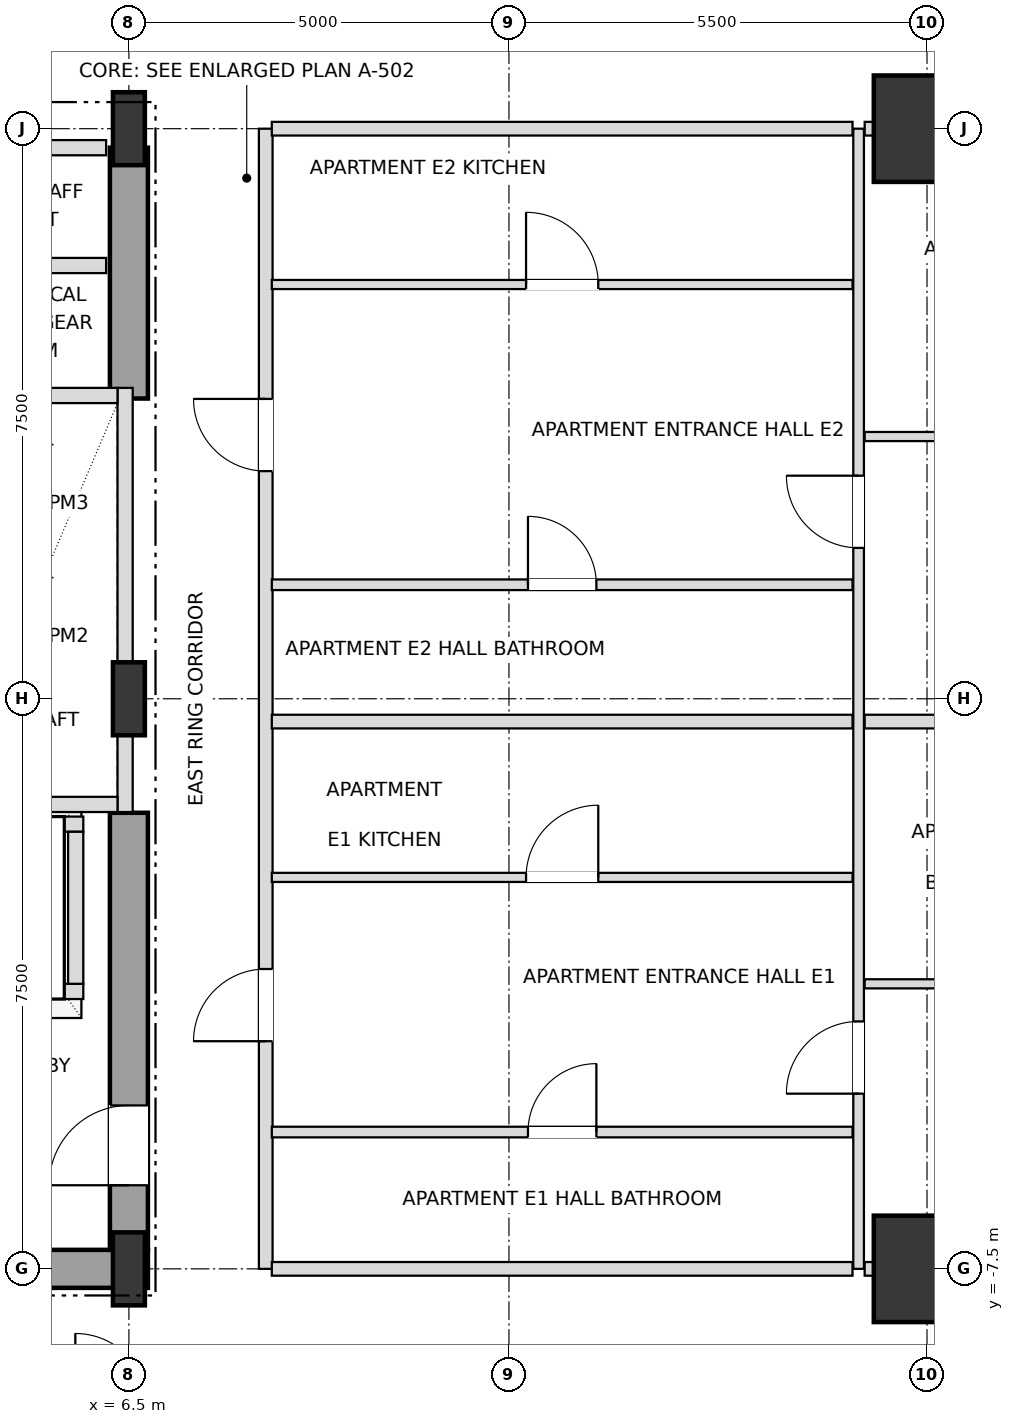
"""IFC4 building model, lengths in metres.
Left out: names, types, materials, properties, quantities, classifications, styles, units other than length and angle.
Written with IfcOpenShell. Run it as: python <this file> out.ifc"""

import sys

from ifc_helpers import new_model, si_unit, direction, frame, frame_2d, origin, origin_2d, place, context, subcontext, project, spatial, rectangle, i_section, extrude, element, fill, save


model = new_model("IFC4")
c1 = context("Model", 3, precision=1e-05, world=origin(), true_north=direction((0.0, 1.0)))
c2 = subcontext(c1, "Body", "Model", "MODEL_VIEW")
j1 = project(units=[si_unit("LENGTHUNIT", "METRE"), si_unit("PLANEANGLEUNIT", "RADIAN")], contexts=[c1])
p1 = place(None, origin())
s1 = spatial("IfcSite", under=j1, at=p1, CompositionType="ELEMENT")
p2 = place(p1, origin())
s2 = spatial("IfcBuilding", under=s1, at=p2, CompositionType="ELEMENT")
p3 = place(p2, frame((0.0, 0.0, 90.0)))
s3 = spatial("IfcBuildingStorey", under=s2, at=p3, CompositionType="ELEMENT", Elevation=90.0)
for number, where, z_axis, x_axis in (
    (1, (6.5, -7.5, 0.0), (0.0, 0.0, 1.0), (1.0, 0.0, 0.0)),
    (2, (6.5, 0.0, 0.0), (0.0, 0.0, 1.0), (1.0, 0.0, 0.0)),
    (3, (6.5, 7.5, 0.0), (0.0, 0.0, 1.0), (1.0, 0.0, 0.0)),
):
    element("IfcColumn", number, at=place(p3, frame(where, z_axis=z_axis, x_axis=x_axis)), inside=s3, PredefinedType="COLUMN", context=c2, shape_type="SweptSolid", body=[
        extrude(i_section(OverallWidth=0.42, OverallDepth=0.96, WebThickness=0.022, FlangeThickness=0.034, at=origin_2d()), origin(), (0.0, 0.0, 1.0), 3.6),
    ])
for number, where, z_axis, x_axis in (
    (4, (17.0, -7.5, 0.0), (0.0, 0.0, 1.0), (1.0, 0.0, 0.0)),
    (5, (17.0, 7.5, 0.0), (0.0, 0.0, 1.0), (1.0, 0.0, 0.0)),
):
    element("IfcColumn", number, at=place(p3, frame(where, z_axis=z_axis, x_axis=x_axis)), inside=s3, PredefinedType="USERDEFINED", context=c2, shape_type="SweptSolid", body=[
        extrude(rectangle(XDim=1.4, YDim=1.4, at=origin_2d()), origin(), (0.0, 0.0, 1.0), 3.6),
    ])
p4 = place(p3, frame((0.0, -7.5, 0.0), z_axis=(0.0, 0.0, 1.0), x_axis=(1.0, 0.0, 0.0)))
e6 = element("IfcWall", 6, at=p4, inside=s3, PredefinedType="SHEAR", context=c2, shape_type="SweptSolid", body=[
    extrude(rectangle(XDim=6.75, YDim=0.5, at=frame_2d((3.375, 0.0))), origin(), (0.0, 0.0, 1.0), 3.3),
])
p5 = place(p3, frame((6.5, -7.25, 0.0), z_axis=(0.0, 0.0, 1.0), x_axis=(0.0, 1.0, 0.0)))
e7 = element("IfcWall", 7, at=p5, inside=s3, PredefinedType="SHEAR", context=c2, shape_type="SweptSolid", body=[
    extrude(rectangle(XDim=5.75, YDim=0.5, at=frame_2d((2.875, 0.0))), origin(), (0.0, 0.0, 1.0), 3.3),
])
p6 = place(p5, frame((0.85, 0.0, 0.0)))
e8 = element("IfcOpeningElement", 8, at=p6, cuts=e7, PredefinedType="OPENING", context=c2, shape_type="SweptSolid", body=[
    extrude(rectangle(XDim=1.05, YDim=2.15, at=frame_2d((0.525, 1.075))), frame((0.0, 0.26, 0.0), z_axis=(0.0, -1.0, 0.0), x_axis=(1.0, 0.0, 0.0)), (0.0, 0.0, 1.0), 0.52),
])
p7 = place(p3, frame((6.5, 3.95, 0.0), z_axis=(0.0, 0.0, 1.0), x_axis=(0.0, 1.0, 0.0)))
e9 = element("IfcWall", 9, at=p7, inside=s3, PredefinedType="SHEAR", context=c2, shape_type="SweptSolid", body=[
    extrude(rectangle(XDim=3.3, YDim=0.5, at=frame_2d((1.65, 0.0))), origin(), (0.0, 0.0, 1.0), 3.3),
])
p8 = place(p3, frame((6.45, -1.49, 0.0), z_axis=(0.0, 0.0, 1.0), x_axis=(0.0, 1.0, 0.0)))
e10 = element("IfcWall", 10, at=p8, inside=s3, PredefinedType="SOLIDWALL", context=c2, shape_type="SweptSolid", body=[
    extrude(rectangle(XDim=5.58, YDim=0.2, at=frame_2d((2.79, 0.0))), origin(), (0.0, 0.0, 1.0), 2.736),
])
for number, where, z_axis, x_axis in (
    (11, (4.15, -1.39, 0.0), (0.0, 0.0, 1.0), (1.0, 0.0, 0.0)),
    (12, (4.15, 3.99, 0.0), (0.0, 0.0, 1.0), (1.0, 0.0, 0.0)),
):
    element("IfcWall", number, at=place(p3, frame(where, z_axis=z_axis, x_axis=x_axis)), inside=s3, PredefinedType="SOLIDWALL", context=c2, shape_type="SweptSolid", body=[
        extrude(rectangle(XDim=2.2, YDim=0.2, at=frame_2d((1.1, 0.0))), origin(), (0.0, 0.0, 1.0), 3.3),
    ])
p9 = place(p3, frame((1.8, -3.85, 0.0), z_axis=(0.0, 0.0, 1.0), x_axis=(1.0, 0.0, 0.0)))
e13 = element("IfcWall", 13, at=p9, inside=s3, PredefinedType="SOLIDWALL", context=c2, shape_type="SweptSolid", body=[
    extrude(rectangle(XDim=4.1, YDim=0.2, at=frame_2d((2.05, 0.0))), origin(), (0.0, 0.0, 1.0), 3.3),
])
p10 = place(p9, frame((0.45, 0.0, 0.0)))
e14 = element("IfcOpeningElement", 14, at=p10, cuts=e13, PredefinedType="OPENING", context=c2, shape_type="SweptSolid", body=[
    extrude(rectangle(XDim=1.2, YDim=2.2, at=frame_2d((0.6, 1.1))), frame((0.0, 0.11, 0.0), z_axis=(0.0, -1.0, 0.0), x_axis=(1.0, 0.0, 0.0)), (0.0, 0.0, 1.0), 0.22),
])
p11 = place(p9, frame((2.45, 0.0, 0.0)))
e15 = element("IfcOpeningElement", 15, at=p11, cuts=e13, PredefinedType="OPENING", context=c2, shape_type="SweptSolid", body=[
    extrude(rectangle(XDim=1.2, YDim=2.2, at=frame_2d((0.6, 1.1))), frame((0.0, 0.11, 0.0), z_axis=(0.0, -1.0, 0.0), x_axis=(1.0, 0.0, 0.0)), (0.0, 0.0, 1.0), 0.22),
])
p12 = place(p3, frame((1.8, -1.65, 0.0), z_axis=(0.0, 0.0, 1.0), x_axis=(1.0, 0.0, 0.0)))
e16 = element("IfcWall", 16, at=p12, inside=s3, PredefinedType="SOLIDWALL", context=c2, shape_type="SweptSolid", body=[
    extrude(rectangle(XDim=4.1, YDim=0.2, at=frame_2d((2.05, 0.0))), origin(), (0.0, 0.0, 1.0), 3.3),
])
p13 = place(p3, frame((5.8, -3.75, 0.0), z_axis=(0.0, 0.0, 1.0), x_axis=(0.0, 1.0, 0.0)))
e17 = element("IfcWall", 17, at=p13, inside=s3, PredefinedType="SOLIDWALL", context=c2, shape_type="SweptSolid", body=[
    extrude(rectangle(XDim=2.0, YDim=0.2, at=frame_2d((1.0, 0.0))), origin(), (0.0, 0.0, 1.0), 3.3),
])
p14 = place(p3, frame((8.3, -7.5, 0.0), z_axis=(0.0, 0.0, 1.0), x_axis=(0.0, 1.0, 0.0)))
e18 = element("IfcWall", 18, at=p14, inside=s3, PredefinedType="PARTITIONING", context=c2, shape_type="SweptSolid", body=[
    extrude(rectangle(XDim=15.0, YDim=0.18, at=frame_2d((7.5, 0.0))), origin(), (0.0, 0.0, 1.0), 3.3),
])
p15 = place(p14, frame((2.995, 0.0, 0.0)))
e19 = element("IfcOpeningElement", 19, at=p15, cuts=e18, PredefinedType="OPENING", context=c2, shape_type="SweptSolid", body=[
    extrude(rectangle(XDim=0.95, YDim=2.15, at=frame_2d((0.475, 1.075))), frame((0.0, 0.1, 0.0), z_axis=(0.0, -1.0, 0.0), x_axis=(1.0, 0.0, 0.0)), (0.0, 0.0, 1.0), 0.2),
])
p16 = place(p14, frame((10.495, 0.0, 0.0)))
e20 = element("IfcOpeningElement", 20, at=p16, cuts=e18, PredefinedType="OPENING", context=c2, shape_type="SweptSolid", body=[
    extrude(rectangle(XDim=0.95, YDim=2.15, at=frame_2d((0.475, 1.075))), frame((0.0, 0.1, 0.0), z_axis=(0.0, -1.0, 0.0), x_axis=(1.0, 0.0, 0.0)), (0.0, 0.0, 1.0), 0.2),
])
p17 = place(p3, frame((16.1, -7.5, 0.0), z_axis=(0.0, 0.0, 1.0), x_axis=(0.0, 1.0, 0.0)))
e21 = element("IfcWall", 21, at=p17, inside=s3, PredefinedType="PARTITIONING", context=c2, shape_type="SweptSolid", body=[
    extrude(rectangle(XDim=15.0, YDim=0.14, at=frame_2d((7.5, 0.0))), origin(), (0.0, 0.0, 1.0), 3.3),
])
p18 = place(p17, frame((2.305, 0.0, 0.0)))
e22 = element("IfcOpeningElement", 22, at=p18, cuts=e21, PredefinedType="OPENING", context=c2, shape_type="SweptSolid", body=[
    extrude(rectangle(XDim=0.95, YDim=2.1, at=frame_2d((0.475, 1.05))), frame((0.0, 0.08, 0.0), z_axis=(0.0, -1.0, 0.0), x_axis=(1.0, 0.0, 0.0)), (0.0, 0.0, 1.0), 0.16),
])
p19 = place(p17, frame((9.485, 0.0, 0.0)))
e23 = element("IfcOpeningElement", 23, at=p19, cuts=e21, PredefinedType="OPENING", context=c2, shape_type="SweptSolid", body=[
    extrude(rectangle(XDim=0.95, YDim=2.1, at=frame_2d((0.475, 1.05))), frame((0.0, 0.08, 0.0), z_axis=(0.0, -1.0, 0.0), x_axis=(1.0, 0.0, 0.0)), (0.0, 0.0, 1.0), 0.16),
])
p20 = place(p3, frame((8.38, -7.5, 0.0), z_axis=(0.0, 0.0, 1.0), x_axis=(1.0, 0.0, 0.0)))
e24 = element("IfcWall", 24, at=p20, inside=s3, PredefinedType="PARTITIONING", context=c2, shape_type="SweptSolid", body=[
    extrude(rectangle(XDim=7.64, YDim=0.18, at=frame_2d((3.82, 0.0))), origin(), (0.0, 0.0, 1.0), 2.736),
])
p21 = place(p3, frame((16.18, -7.5, 0.0), z_axis=(0.0, 0.0, 1.0), x_axis=(1.0, 0.0, 0.0)))
e25 = element("IfcWall", 25, at=p21, inside=s3, PredefinedType="PARTITIONING", context=c2, shape_type="SweptSolid", body=[
    extrude(rectangle(XDim=5.72, YDim=0.18, at=frame_2d((2.86, 0.0))), origin(), (0.0, 0.0, 1.0), 2.736),
])
p22 = place(p3, frame((8.38, -5.7, 0.0), z_axis=(0.0, 0.0, 1.0), x_axis=(1.0, 0.0, 0.0)))
e26 = element("IfcWall", 26, at=p22, inside=s3, PredefinedType="PARTITIONING", context=c2, shape_type="SweptSolid", body=[
    extrude(rectangle(XDim=7.64, YDim=0.14, at=frame_2d((3.82, 0.0))), origin(), (0.0, 0.0, 1.0), 2.868),
])
p23 = place(p22, frame((3.37, 0.0, 0.0)))
e27 = element("IfcOpeningElement", 27, at=p23, cuts=e26, PredefinedType="OPENING", context=c2, shape_type="SweptSolid", body=[
    extrude(rectangle(XDim=0.9, YDim=2.1, at=frame_2d((0.45, 1.05))), frame((0.0, 0.08, 0.0), z_axis=(0.0, -1.0, 0.0), x_axis=(1.0, 0.0, 0.0)), (0.0, 0.0, 1.0), 0.16),
])
p24 = place(p3, frame((16.18, -3.75, 0.0), z_axis=(0.0, 0.0, 1.0), x_axis=(1.0, 0.0, 0.0)))
e28 = element("IfcWall", 28, at=p24, inside=s3, PredefinedType="PARTITIONING", context=c2, shape_type="SweptSolid", body=[
    extrude(rectangle(XDim=5.64, YDim=0.12, at=frame_2d((2.82, 0.0))), origin(), (0.0, 0.0, 1.0), 2.736),
])
p25 = place(p24, frame((2.37, 0.0, 0.0)))
e29 = element("IfcOpeningElement", 29, at=p25, cuts=e28, PredefinedType="OPENING", context=c2, shape_type="SweptSolid", body=[
    extrude(rectangle(XDim=0.9, YDim=2.1, at=frame_2d((0.45, 1.05))), frame((0.0, 0.07, 0.0), z_axis=(0.0, -1.0, 0.0), x_axis=(1.0, 0.0, 0.0)), (0.0, 0.0, 1.0), 0.14),
])
p26 = place(p3, frame((8.38, -2.35, 0.0), z_axis=(0.0, 0.0, 1.0), x_axis=(1.0, 0.0, 0.0)))
e30 = element("IfcWall", 30, at=p26, inside=s3, PredefinedType="PARTITIONING", context=c2, shape_type="SweptSolid", body=[
    extrude(rectangle(XDim=7.64, YDim=0.12, at=frame_2d((3.82, 0.0))), origin(), (0.0, 0.0, 1.0), 2.868),
])
p27 = place(p26, frame((3.345, 0.0, 0.0)))
e31 = element("IfcOpeningElement", 31, at=p27, cuts=e30, PredefinedType="OPENING", context=c2, shape_type="SweptSolid", body=[
    extrude(rectangle(XDim=0.95, YDim=2.1, at=frame_2d((0.475, 1.05))), frame((0.0, 0.07, 0.0), z_axis=(0.0, -1.0, 0.0), x_axis=(1.0, 0.0, 0.0)), (0.0, 0.0, 1.0), 0.14),
])
p28 = place(p3, frame((8.38, -0.3, 0.0), z_axis=(0.0, 0.0, 1.0), x_axis=(1.0, 0.0, 0.0)))
e32 = element("IfcWall", 32, at=p28, inside=s3, PredefinedType="PARTITIONING", context=c2, shape_type="SweptSolid", body=[
    extrude(rectangle(XDim=7.64, YDim=0.18, at=frame_2d((3.82, 0.0))), origin(), (0.0, 0.0, 1.0), 2.868),
])
p29 = place(p3, frame((16.18, -0.3, 0.0), z_axis=(0.0, 0.0, 1.0), x_axis=(1.0, 0.0, 0.0)))
e33 = element("IfcWall", 33, at=p29, inside=s3, PredefinedType="PARTITIONING", context=c2, shape_type="SweptSolid", body=[
    extrude(rectangle(XDim=5.64, YDim=0.18, at=frame_2d((2.82, 0.0))), origin(), (0.0, 0.0, 1.0), 2.736),
])
p30 = place(p3, frame((8.38, 1.5, 0.0), z_axis=(0.0, 0.0, 1.0), x_axis=(1.0, 0.0, 0.0)))
e34 = element("IfcWall", 34, at=p30, inside=s3, PredefinedType="PARTITIONING", context=c2, shape_type="SweptSolid", body=[
    extrude(rectangle(XDim=7.64, YDim=0.14, at=frame_2d((3.82, 0.0))), origin(), (0.0, 0.0, 1.0), 2.868),
])
p31 = place(p30, frame((3.37, 0.0, 0.0)))
e35 = element("IfcOpeningElement", 35, at=p31, cuts=e34, PredefinedType="OPENING", context=c2, shape_type="SweptSolid", body=[
    extrude(rectangle(XDim=0.9, YDim=2.1, at=frame_2d((0.45, 1.05))), frame((0.0, 0.08, 0.0), z_axis=(0.0, -1.0, 0.0), x_axis=(1.0, 0.0, 0.0)), (0.0, 0.0, 1.0), 0.16),
])
p32 = place(p3, frame((16.18, 3.45, 0.0), z_axis=(0.0, 0.0, 1.0), x_axis=(1.0, 0.0, 0.0)))
e36 = element("IfcWall", 36, at=p32, inside=s3, PredefinedType="PARTITIONING", context=c2, shape_type="SweptSolid", body=[
    extrude(rectangle(XDim=5.64, YDim=0.12, at=frame_2d((2.82, 0.0))), origin(), (0.0, 0.0, 1.0), 2.736),
])
p33 = place(p32, frame((2.37, 0.0, 0.0)))
e37 = element("IfcOpeningElement", 37, at=p33, cuts=e36, PredefinedType="OPENING", context=c2, shape_type="SweptSolid", body=[
    extrude(rectangle(XDim=0.9, YDim=2.1, at=frame_2d((0.45, 1.05))), frame((0.0, 0.07, 0.0), z_axis=(0.0, -1.0, 0.0), x_axis=(1.0, 0.0, 0.0)), (0.0, 0.0, 1.0), 0.14),
])
p34 = place(p3, frame((8.38, 5.45, 0.0), z_axis=(0.0, 0.0, 1.0), x_axis=(1.0, 0.0, 0.0)))
e38 = element("IfcWall", 38, at=p34, inside=s3, PredefinedType="PARTITIONING", context=c2, shape_type="SweptSolid", body=[
    extrude(rectangle(XDim=7.64, YDim=0.12, at=frame_2d((3.82, 0.0))), origin(), (0.0, 0.0, 1.0), 2.868),
])
p35 = place(p34, frame((3.345, 0.0, 0.0)))
e39 = element("IfcOpeningElement", 39, at=p35, cuts=e38, PredefinedType="OPENING", context=c2, shape_type="SweptSolid", body=[
    extrude(rectangle(XDim=0.95, YDim=2.1, at=frame_2d((0.475, 1.05))), frame((0.0, 0.07, 0.0), z_axis=(0.0, -1.0, 0.0), x_axis=(1.0, 0.0, 0.0)), (0.0, 0.0, 1.0), 0.14),
])
for number, where, z_axis, x_axis in (
    (40, (4.13, 5.7, 0.0), (0.0, 0.0, 1.0), (1.0, 0.0, 0.0)),
    (41, (4.13, 7.25, 0.0), (0.0, 0.0, 1.0), (1.0, 0.0, 0.0)),
):
    element("IfcWall", number, at=place(p3, frame(where, z_axis=z_axis, x_axis=x_axis)), inside=s3, PredefinedType="SOLIDWALL", context=c2, shape_type="SweptSolid", body=[
        extrude(rectangle(XDim=2.07, YDim=0.2, at=frame_2d((1.035, 0.0))), origin(), (0.0, 0.0, 1.0), 3.3),
    ])
p36 = place(p3, frame((8.38, 7.5, 0.0), z_axis=(0.0, 0.0, 1.0), x_axis=(1.0, 0.0, 0.0)))
e42 = element("IfcWall", 42, at=p36, inside=s3, PredefinedType="PARTITIONING", context=c2, shape_type="SweptSolid", body=[
    extrude(rectangle(XDim=7.64, YDim=0.18, at=frame_2d((3.82, 0.0))), origin(), (0.0, 0.0, 1.0), 2.736),
])
p37 = place(p3, frame((16.18, 7.5, 0.0), z_axis=(0.0, 0.0, 1.0), x_axis=(1.0, 0.0, 0.0)))
e43 = element("IfcWall", 43, at=p37, inside=s3, PredefinedType="PARTITIONING", context=c2, shape_type="SweptSolid", body=[
    extrude(rectangle(XDim=5.72, YDim=0.18, at=frame_2d((2.86, 0.0))), origin(), (0.0, 0.0, 1.0), 2.736),
])
p38 = place(p6, origin())
e44 = element("IfcDoor", 44, at=p38, inside=s3, OperationType="SINGLE_SWING_LEFT", PredefinedType="DOOR", context=c2, shape_type="SweptSolid", body=[
    extrude(rectangle(XDim=1.05, YDim=2.15, at=frame_2d((0.525, 1.075))), frame((0.0, 0.025, 0.0), z_axis=(0.0, -1.0, 0.0), x_axis=(1.0, 0.0, 0.0)), (0.0, 0.0, 1.0), 0.05),
])
fill(e8, e44)
p39 = place(p23, origin())
e45 = element("IfcDoor", 45, at=p39, inside=s3, OperationType="SINGLE_SWING_RIGHT", PredefinedType="DOOR", context=c2, shape_type="SweptSolid", body=[
    extrude(rectangle(XDim=0.9, YDim=2.1, at=frame_2d((0.45, 1.05))), frame((0.0, 0.025, 0.0), z_axis=(0.0, -1.0, 0.0), x_axis=(1.0, 0.0, 0.0)), (0.0, 0.0, 1.0), 0.05),
])
fill(e27, e45)
p40 = place(p15, origin())
e46 = element("IfcDoor", 46, at=p40, inside=s3, OperationType="SINGLE_SWING_LEFT", PredefinedType="DOOR", context=c2, shape_type="SweptSolid", body=[
    extrude(rectangle(XDim=0.95, YDim=2.15, at=frame_2d((0.475, 1.075))), frame((0.0, 0.025, 0.0), z_axis=(0.0, -1.0, 0.0), x_axis=(1.0, 0.0, 0.0)), (0.0, 0.0, 1.0), 0.05),
])
fill(e19, e46)
p41 = place(p27, origin())
e47 = element("IfcDoor", 47, at=p41, inside=s3, OperationType="SINGLE_SWING_RIGHT", PredefinedType="DOOR", context=c2, shape_type="SweptSolid", body=[
    extrude(rectangle(XDim=0.95, YDim=2.1, at=frame_2d((0.475, 1.05))), frame((0.0, 0.025, 0.0), z_axis=(0.0, -1.0, 0.0), x_axis=(1.0, 0.0, 0.0)), (0.0, 0.0, 1.0), 0.05),
])
fill(e31, e47)
p42 = place(p18, origin())
e48 = element("IfcDoor", 48, at=p42, inside=s3, OperationType="SINGLE_SWING_LEFT", PredefinedType="DOOR", context=c2, shape_type="SweptSolid", body=[
    extrude(rectangle(XDim=0.95, YDim=2.1, at=frame_2d((0.475, 1.05))), frame((0.0, 0.025, 0.0), z_axis=(0.0, -1.0, 0.0), x_axis=(1.0, 0.0, 0.0)), (0.0, 0.0, 1.0), 0.05),
])
fill(e22, e48)
p43 = place(p31, origin())
e49 = element("IfcDoor", 49, at=p43, inside=s3, OperationType="SINGLE_SWING_LEFT", PredefinedType="DOOR", context=c2, shape_type="SweptSolid", body=[
    extrude(rectangle(XDim=0.9, YDim=2.1, at=frame_2d((0.45, 1.05))), frame((0.0, 0.025, 0.0), z_axis=(0.0, -1.0, 0.0), x_axis=(1.0, 0.0, 0.0)), (0.0, 0.0, 1.0), 0.05),
])
fill(e35, e49)
p44 = place(p16, origin())
e50 = element("IfcDoor", 50, at=p44, inside=s3, OperationType="SINGLE_SWING_RIGHT", PredefinedType="DOOR", context=c2, shape_type="SweptSolid", body=[
    extrude(rectangle(XDim=0.95, YDim=2.15, at=frame_2d((0.475, 1.075))), frame((0.0, 0.025, 0.0), z_axis=(0.0, -1.0, 0.0), x_axis=(1.0, 0.0, 0.0)), (0.0, 0.0, 1.0), 0.05),
])
fill(e20, e50)
p45 = place(p35, origin())
e51 = element("IfcDoor", 51, at=p45, inside=s3, OperationType="SINGLE_SWING_LEFT", PredefinedType="DOOR", context=c2, shape_type="SweptSolid", body=[
    extrude(rectangle(XDim=0.95, YDim=2.1, at=frame_2d((0.475, 1.05))), frame((0.0, 0.025, 0.0), z_axis=(0.0, -1.0, 0.0), x_axis=(1.0, 0.0, 0.0)), (0.0, 0.0, 1.0), 0.05),
])
fill(e39, e51)
p46 = place(p19, origin())
e52 = element("IfcDoor", 52, at=p46, inside=s3, OperationType="SINGLE_SWING_RIGHT", PredefinedType="DOOR", context=c2, shape_type="SweptSolid", body=[
    extrude(rectangle(XDim=0.95, YDim=2.1, at=frame_2d((0.475, 1.05))), frame((0.0, 0.025, 0.0), z_axis=(0.0, -1.0, 0.0), x_axis=(1.0, 0.0, 0.0)), (0.0, 0.0, 1.0), 0.05),
])
fill(e23, e52)
save(model, sys.argv[1])
